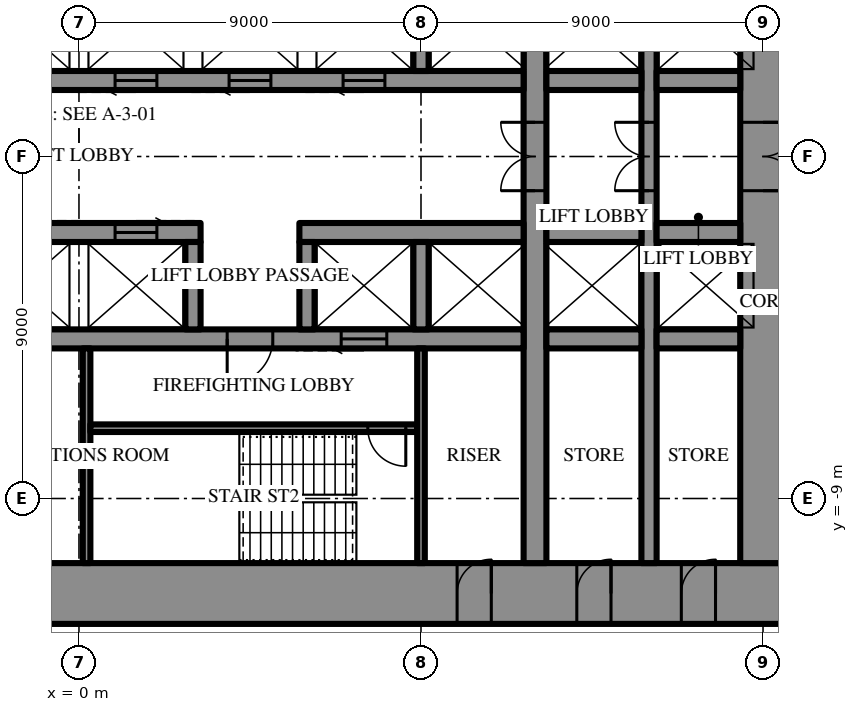
"""IFC4 building model, lengths in metres.
Left out: names, types, materials, properties, quantities, classifications, styles, units other than length and angle.
Written with IfcOpenShell. Run it as: python <this file> out.ifc"""

import sys

from ifc_helpers import new_model, si_unit, direction, frame, frame_2d, origin, place, context, subcontext, project, spatial, rectangle, extrude, element, fill, save


model = new_model("IFC4")
c1 = context("Model", 3, precision=1e-05, world=origin(), true_north=direction((0.0, 1.0)))
c2 = subcontext(c1, "Body", "Model", "MODEL_VIEW")
j1 = project(units=[si_unit("LENGTHUNIT", "METRE"), si_unit("PLANEANGLEUNIT", "RADIAN")], contexts=[c1])
p1 = place(None, origin())
s1 = spatial("IfcSite", under=j1, at=p1, CompositionType="ELEMENT")
p2 = place(p1, origin())
s2 = spatial("IfcBuilding", under=s1, at=p2, CompositionType="ELEMENT")
p3 = place(p2, frame((0.0, 0.0, 48.7)))
s3 = spatial("IfcBuildingStorey", under=s2, at=p3, CompositionType="ELEMENT", Elevation=48.7)
p4 = place(p3, frame((18.6, -11.5, 0.0), z_axis=(0.0, 0.0, 1.0), x_axis=(-1.0, 0.0, 0.0)))
e1 = element("IfcWall", 1, at=p4, inside=s3, PredefinedType="SHEAR", context=c2, shape_type="SweptSolid", body=[
    extrude(rectangle(XDim=37.2, YDim=1.6, at=frame_2d((18.6, 0.0))), origin(), (0.0, 0.0, 1.0), 4.2),
])
p5 = place(p4, frame((19.45, 0.0, 0.0)))
e2 = element("IfcOpeningElement", 2, at=p5, cuts=e1, PredefinedType="OPENING", context=c2, shape_type="SweptSolid", body=[
    extrude(rectangle(XDim=0.9, YDim=2.2, at=frame_2d((0.45, 1.1))), frame((0.0, 0.81, 0.0), z_axis=(0.0, -1.0, 0.0), x_axis=(1.0, 0.0, 0.0)), (0.0, 0.0, 1.0), 1.62),
])
p6 = place(p4, frame((22.45, 0.0, 0.0)))
e3 = element("IfcOpeningElement", 3, at=p6, cuts=e1, PredefinedType="OPENING", context=c2, shape_type="SweptSolid", body=[
    extrude(rectangle(XDim=0.9, YDim=2.2, at=frame_2d((0.45, 1.1))), frame((0.0, 0.81, 0.0), z_axis=(0.0, -1.0, 0.0), x_axis=(1.0, 0.0, 0.0)), (0.0, 0.0, 1.0), 1.62),
])
p7 = place(p4, frame((25.5, 0.0, 0.0)))
e4 = element("IfcOpeningElement", 4, at=p7, cuts=e1, PredefinedType="OPENING", context=c2, shape_type="SweptSolid", body=[
    extrude(rectangle(XDim=1.0, YDim=2.2, at=frame_2d((0.5, 1.1))), frame((0.0, 0.81, 0.0), z_axis=(0.0, -1.0, 0.0), x_axis=(1.0, 0.0, 0.0)), (0.0, 0.0, 1.0), 1.62),
])
p8 = place(p4, frame((1.85, 0.0, 0.0)))
e5 = element("IfcOpeningElement", 5, at=p8, cuts=e1, PredefinedType="OPENING", context=c2, shape_type="SweptSolid", body=[
    extrude(rectangle(XDim=0.9, YDim=2.2, at=frame_2d((0.45, 1.1))), frame((0.0, 0.81, 0.0), z_axis=(0.0, -1.0, 0.0), x_axis=(1.0, 0.0, 0.0)), (0.0, 0.0, 1.0), 1.62),
])
p9 = place(p4, frame((4.6, 0.0, 0.0)))
e6 = element("IfcOpeningElement", 6, at=p9, cuts=e1, PredefinedType="OPENING", context=c2, shape_type="SweptSolid", body=[
    extrude(rectangle(XDim=0.9, YDim=2.2, at=frame_2d((0.45, 1.1))), frame((0.0, 0.81, 0.0), z_axis=(0.0, -1.0, 0.0), x_axis=(1.0, 0.0, 0.0)), (0.0, 0.0, 1.0), 1.62),
])
p10 = place(p4, frame((7.75, 0.0, 0.0)))
e7 = element("IfcOpeningElement", 7, at=p10, cuts=e1, PredefinedType="OPENING", context=c2, shape_type="SweptSolid", body=[
    extrude(rectangle(XDim=0.9, YDim=2.2, at=frame_2d((0.45, 1.1))), frame((0.0, 0.81, 0.0), z_axis=(0.0, -1.0, 0.0), x_axis=(1.0, 0.0, 0.0)), (0.0, 0.0, 1.0), 1.62),
])
p11 = place(p4, frame((28.55, 0.0, 0.0)))
e8 = element("IfcOpeningElement", 8, at=p11, cuts=e1, PredefinedType="OPENING", context=c2, shape_type="SweptSolid", body=[
    extrude(rectangle(XDim=0.9, YDim=2.2, at=frame_2d((0.45, 1.1))), frame((0.0, 0.81, 0.0), z_axis=(0.0, -1.0, 0.0), x_axis=(1.0, 0.0, 0.0)), (0.0, 0.0, 1.0), 1.62),
])
p12 = place(p4, frame((31.7, 0.0, 0.0)))
e9 = element("IfcOpeningElement", 9, at=p12, cuts=e1, PredefinedType="OPENING", context=c2, shape_type="SweptSolid", body=[
    extrude(rectangle(XDim=0.9, YDim=2.2, at=frame_2d((0.45, 1.1))), frame((0.0, 0.81, 0.0), z_axis=(0.0, -1.0, 0.0), x_axis=(1.0, 0.0, 0.0)), (0.0, 0.0, 1.0), 1.62),
])
p13 = place(p4, frame((34.45, 0.0, 0.0)))
e10 = element("IfcOpeningElement", 10, at=p13, cuts=e1, PredefinedType="OPENING", context=c2, shape_type="SweptSolid", body=[
    extrude(rectangle(XDim=0.9, YDim=2.2, at=frame_2d((0.45, 1.1))), frame((0.0, 0.81, 0.0), z_axis=(0.0, -1.0, 0.0), x_axis=(1.0, 0.0, 0.0)), (0.0, 0.0, 1.0), 1.62),
])
p14 = place(p3, frame((18.0, -10.7, 0.0), z_axis=(0.0, 0.0, 1.0), x_axis=(0.0, 1.0, 0.0)))
e11 = element("IfcWall", 11, at=p14, inside=s3, PredefinedType="SHEAR", context=c2, shape_type="SweptSolid", body=[
    extrude(rectangle(XDim=21.4, YDim=1.2, at=frame_2d((10.7, 0.0))), origin(), (0.0, 0.0, 1.0), 4.2),
])
p15 = place(p14, frame((9.8, 0.0, 0.0)))
e12 = element("IfcOpeningElement", 12, at=p15, cuts=e11, PredefinedType="OPENING", context=c2, shape_type="SweptSolid", body=[
    extrude(rectangle(XDim=1.8, YDim=2.4, at=frame_2d((0.9, 1.2))), frame((0.0, 0.61, 0.0), z_axis=(0.0, -1.0, 0.0), x_axis=(1.0, 0.0, 0.0)), (0.0, 0.0, 1.0), 1.22),
])
p16 = place(p3, frame((12.0, -10.7, 0.0), z_axis=(0.0, 0.0, 1.0), x_axis=(0.0, 1.0, 0.0)))
e13 = element("IfcWall", 13, at=p16, inside=s3, PredefinedType="SHEAR", context=c2, shape_type="SweptSolid", body=[
    extrude(rectangle(XDim=21.4, YDim=0.6, at=frame_2d((10.7, 0.0))), origin(), (0.0, 0.0, 1.0), 4.2),
])
p17 = place(p16, frame((9.8, 0.0, 0.0)))
e14 = element("IfcOpeningElement", 14, at=p17, cuts=e13, PredefinedType="OPENING", context=c2, shape_type="SweptSolid", body=[
    extrude(rectangle(XDim=1.8, YDim=2.4, at=frame_2d((0.9, 1.2))), frame((0.0, 0.31, 0.0), z_axis=(0.0, -1.0, 0.0), x_axis=(1.0, 0.0, 0.0)), (0.0, 0.0, 1.0), 0.62),
])
p18 = place(p3, frame((15.0, -10.7, 0.0), z_axis=(0.0, 0.0, 1.0), x_axis=(0.0, 1.0, 0.0)))
e15 = element("IfcWall", 15, at=p18, inside=s3, PredefinedType="SHEAR", context=c2, shape_type="SweptSolid", body=[
    extrude(rectangle(XDim=21.4, YDim=0.4, at=frame_2d((10.7, 0.0))), origin(), (0.0, 0.0, 1.0), 4.2),
])
p19 = place(p18, frame((9.8, 0.0, 0.0)))
e16 = element("IfcOpeningElement", 16, at=p19, cuts=e15, PredefinedType="OPENING", context=c2, shape_type="SweptSolid", body=[
    extrude(rectangle(XDim=1.8, YDim=2.4, at=frame_2d((0.9, 1.2))), frame((0.0, 0.21, 0.0), z_axis=(0.0, -1.0, 0.0), x_axis=(1.0, 0.0, 0.0)), (0.0, 0.0, 1.0), 0.42),
])
p20 = place(p3, frame((-3.2, 2.0, 0.0), z_axis=(0.0, 0.0, 1.0), x_axis=(1.0, 0.0, 0.0)))
e17 = element("IfcWall", 17, at=p20, inside=s3, PredefinedType="SHEAR", context=c2, shape_type="SweptSolid", body=[
    extrude(rectangle(XDim=14.9, YDim=0.5, at=frame_2d((7.45, 0.0))), origin(), (0.0, 0.0, 1.0), 4.2),
])
p21 = place(p20, frame((1.15, 0.0, 0.0)))
e18 = element("IfcOpeningElement", 18, at=p21, cuts=e17, PredefinedType="OPENING", context=c2, shape_type="SweptSolid", body=[
    extrude(rectangle(XDim=1.1, YDim=2.2, at=frame_2d((0.55, 1.1))), frame((0.0, 0.26, 0.0), z_axis=(0.0, -1.0, 0.0), x_axis=(1.0, 0.0, 0.0)), (0.0, 0.0, 1.0), 0.52),
])
p22 = place(p20, frame((4.15, 0.0, 0.0)))
e19 = element("IfcOpeningElement", 19, at=p22, cuts=e17, PredefinedType="OPENING", context=c2, shape_type="SweptSolid", body=[
    extrude(rectangle(XDim=1.1, YDim=2.2, at=frame_2d((0.55, 1.1))), frame((0.0, 0.26, 0.0), z_axis=(0.0, -1.0, 0.0), x_axis=(1.0, 0.0, 0.0)), (0.0, 0.0, 1.0), 0.52),
])
p23 = place(p20, frame((7.15, 0.0, 0.0)))
e20 = element("IfcOpeningElement", 20, at=p23, cuts=e17, PredefinedType="OPENING", context=c2, shape_type="SweptSolid", body=[
    extrude(rectangle(XDim=1.1, YDim=2.2, at=frame_2d((0.55, 1.1))), frame((0.0, 0.26, 0.0), z_axis=(0.0, -1.0, 0.0), x_axis=(1.0, 0.0, 0.0)), (0.0, 0.0, 1.0), 0.52),
])
p24 = place(p20, frame((10.15, 0.0, 0.0)))
e21 = element("IfcOpeningElement", 21, at=p24, cuts=e17, PredefinedType="OPENING", context=c2, shape_type="SweptSolid", body=[
    extrude(rectangle(XDim=1.1, YDim=2.2, at=frame_2d((0.55, 1.1))), frame((0.0, 0.26, 0.0), z_axis=(0.0, -1.0, 0.0), x_axis=(1.0, 0.0, 0.0)), (0.0, 0.0, 1.0), 0.52),
])
p25 = place(p3, frame((12.3, 2.0, 0.0), z_axis=(0.0, 0.0, 1.0), x_axis=(1.0, 0.0, 0.0)))
e22 = element("IfcWall", 22, at=p25, inside=s3, PredefinedType="SHEAR", context=c2, shape_type="SweptSolid", body=[
    extrude(rectangle(XDim=2.5, YDim=0.5, at=frame_2d((1.25, 0.0))), origin(), (0.0, 0.0, 1.0), 4.2),
])
p26 = place(p3, frame((15.2, 2.0, 0.0), z_axis=(0.0, 0.0, 1.0), x_axis=(1.0, 0.0, 0.0)))
e23 = element("IfcWall", 23, at=p26, inside=s3, PredefinedType="SHEAR", context=c2, shape_type="SweptSolid", body=[
    extrude(rectangle(XDim=2.2, YDim=0.5, at=frame_2d((1.1, 0.0))), origin(), (0.0, 0.0, 1.0), 4.2),
])
p27 = place(p3, frame((9.0, 2.25, 0.0), z_axis=(0.0, 0.0, 1.0), x_axis=(0.0, 1.0, 0.0)))
e24 = element("IfcWall", 24, at=p27, inside=s3, PredefinedType="SHEAR", context=c2, shape_type="SweptSolid", body=[
    extrude(rectangle(XDim=2.3, YDim=0.4, at=frame_2d((1.15, 0.0))), origin(), (0.0, 0.0, 1.0), 4.2),
])
p28 = place(p3, frame((17.4, -2.0, 0.0), z_axis=(0.0, 0.0, 1.0), x_axis=(-1.0, 0.0, 0.0)))
e25 = element("IfcWall", 25, at=p28, inside=s3, PredefinedType="SHEAR", context=c2, shape_type="SweptSolid", body=[
    extrude(rectangle(XDim=2.2, YDim=0.5, at=frame_2d((1.1, 0.0))), origin(), (0.0, 0.0, 1.0), 4.2),
])
p29 = place(p3, frame((14.8, -2.0, 0.0), z_axis=(0.0, 0.0, 1.0), x_axis=(-1.0, 0.0, 0.0)))
e26 = element("IfcWall", 26, at=p29, inside=s3, PredefinedType="SHEAR", context=c2, shape_type="SweptSolid", body=[
    extrude(rectangle(XDim=2.5, YDim=0.5, at=frame_2d((1.25, 0.0))), origin(), (0.0, 0.0, 1.0), 4.2),
])
p30 = place(p3, frame((11.7, -2.0, 0.0), z_axis=(0.0, 0.0, 1.0), x_axis=(-1.0, 0.0, 0.0)))
e27 = element("IfcWall", 27, at=p30, inside=s3, PredefinedType="SHEAR", context=c2, shape_type="SweptSolid", body=[
    extrude(rectangle(XDim=5.9, YDim=0.5, at=frame_2d((2.95, 0.0))), origin(), (0.0, 0.0, 1.0), 4.2),
])
p31 = place(p3, frame((3.2, -2.0, 0.0), z_axis=(0.0, 0.0, 1.0), x_axis=(-1.0, 0.0, 0.0)))
e28 = element("IfcWall", 28, at=p31, inside=s3, PredefinedType="SHEAR", context=c2, shape_type="SweptSolid", body=[
    extrude(rectangle(XDim=14.9, YDim=0.5, at=frame_2d((7.45, 0.0))), origin(), (0.0, 0.0, 1.0), 4.2),
])
p32 = place(p31, frame((1.15, 0.0, 0.0)))
e29 = element("IfcOpeningElement", 29, at=p32, cuts=e28, PredefinedType="OPENING", context=c2, shape_type="SweptSolid", body=[
    extrude(rectangle(XDim=1.1, YDim=2.2, at=frame_2d((0.55, 1.1))), frame((0.0, 0.26, 0.0), z_axis=(0.0, -1.0, 0.0), x_axis=(1.0, 0.0, 0.0)), (0.0, 0.0, 1.0), 0.52),
])
p33 = place(p31, frame((4.15, 0.0, 0.0)))
e30 = element("IfcOpeningElement", 30, at=p33, cuts=e28, PredefinedType="OPENING", context=c2, shape_type="SweptSolid", body=[
    extrude(rectangle(XDim=1.1, YDim=2.2, at=frame_2d((0.55, 1.1))), frame((0.0, 0.26, 0.0), z_axis=(0.0, -1.0, 0.0), x_axis=(1.0, 0.0, 0.0)), (0.0, 0.0, 1.0), 0.52),
])
p34 = place(p31, frame((7.15, 0.0, 0.0)))
e31 = element("IfcOpeningElement", 31, at=p34, cuts=e28, PredefinedType="OPENING", context=c2, shape_type="SweptSolid", body=[
    extrude(rectangle(XDim=1.1, YDim=2.2, at=frame_2d((0.55, 1.1))), frame((0.0, 0.26, 0.0), z_axis=(0.0, -1.0, 0.0), x_axis=(1.0, 0.0, 0.0)), (0.0, 0.0, 1.0), 0.52),
])
p35 = place(p31, frame((10.15, 0.0, 0.0)))
e32 = element("IfcOpeningElement", 32, at=p35, cuts=e28, PredefinedType="OPENING", context=c2, shape_type="SweptSolid", body=[
    extrude(rectangle(XDim=1.1, YDim=2.2, at=frame_2d((0.55, 1.1))), frame((0.0, 0.26, 0.0), z_axis=(0.0, -1.0, 0.0), x_axis=(1.0, 0.0, 0.0)), (0.0, 0.0, 1.0), 0.52),
])
p36 = place(p3, frame((17.4, -4.8, 0.0), z_axis=(0.0, 0.0, 1.0), x_axis=(-1.0, 0.0, 0.0)))
e33 = element("IfcWall", 33, at=p36, inside=s3, PredefinedType="SHEAR", context=c2, shape_type="SweptSolid", body=[
    extrude(rectangle(XDim=2.2, YDim=0.5, at=frame_2d((1.1, 0.0))), origin(), (0.0, 0.0, 1.0), 4.2),
])
p37 = place(p3, frame((14.8, -4.8, 0.0), z_axis=(0.0, 0.0, 1.0), x_axis=(-1.0, 0.0, 0.0)))
e34 = element("IfcWall", 34, at=p37, inside=s3, PredefinedType="SHEAR", context=c2, shape_type="SweptSolid", body=[
    extrude(rectangle(XDim=2.5, YDim=0.5, at=frame_2d((1.25, 0.0))), origin(), (0.0, 0.0, 1.0), 4.2),
])
p38 = place(p3, frame((11.7, -4.8, 0.0), z_axis=(0.0, 0.0, 1.0), x_axis=(-1.0, 0.0, 0.0)))
e35 = element("IfcWall", 35, at=p38, inside=s3, PredefinedType="SHEAR", context=c2, shape_type="SweptSolid", body=[
    extrude(rectangle(XDim=23.4, YDim=0.5, at=frame_2d((11.7, 0.0))), origin(), (0.0, 0.0, 1.0), 4.2),
])
p39 = place(p38, frame((6.6, 0.0, 0.0)))
e36 = element("IfcOpeningElement", 36, at=p39, cuts=e35, PredefinedType="OPENING", context=c2, shape_type="SweptSolid", body=[
    extrude(rectangle(XDim=1.2, YDim=2.2, at=frame_2d((0.6, 1.1))), frame((0.0, 0.26, 0.0), z_axis=(0.0, -1.0, 0.0), x_axis=(1.0, 0.0, 0.0)), (0.0, 0.0, 1.0), 0.52),
])
p40 = place(p38, frame((3.6, 0.0, 0.0)))
e37 = element("IfcOpeningElement", 37, at=p40, cuts=e35, PredefinedType="OPENING", context=c2, shape_type="SweptSolid", body=[
    extrude(rectangle(XDim=1.2, YDim=2.2, at=frame_2d((0.6, 1.1))), frame((0.0, 0.26, 0.0), z_axis=(0.0, -1.0, 0.0), x_axis=(1.0, 0.0, 0.0)), (0.0, 0.0, 1.0), 0.52),
])
for number, where, z_axis, x_axis in (
    (38, (9.0, -2.25, 0.0), (0.0, 0.0, 1.0), (0.0, -1.0, 0.0)),
    (39, (6.0, -2.25, 0.0), (0.0, 0.0, 1.0), (0.0, -1.0, 0.0)),
    (40, (3.0, -2.25, 0.0), (0.0, 0.0, 1.0), (0.0, -1.0, 0.0)),
):
    element("IfcWall", number, at=place(p3, frame(where, z_axis=z_axis, x_axis=x_axis)), inside=s3, PredefinedType="SHEAR", context=c2, shape_type="SweptSolid", body=[
        extrude(rectangle(XDim=2.3, YDim=0.4, at=frame_2d((1.15, 0.0))), origin(), (0.0, 0.0, 1.0), 4.2),
    ])
p41 = place(p3, frame((0.2, -5.05, 0.0), z_axis=(0.0, 0.0, 1.0), x_axis=(0.0, -1.0, 0.0)))
e41 = element("IfcWall", 41, at=p41, inside=s3, PredefinedType="SHEAR", context=c2, shape_type="SweptSolid", body=[
    extrude(rectangle(XDim=5.65, YDim=0.2, at=frame_2d((2.825, 0.0))), origin(), (0.0, 0.0, 1.0), 4.2),
])
p42 = place(p3, frame((8.9, -7.15, 0.0), z_axis=(0.0, 0.0, 1.0), x_axis=(-1.0, 0.0, 0.0)))
e42 = element("IfcWall", 42, at=p42, inside=s3, PredefinedType="SHEAR", context=c2, shape_type="SweptSolid", body=[
    extrude(rectangle(XDim=8.6, YDim=0.2, at=frame_2d((4.3, 0.0))), origin(), (0.0, 0.0, 1.0), 4.2),
])
p43 = place(p42, frame((0.3, 0.0, 0.0)))
e43 = element("IfcOpeningElement", 43, at=p43, cuts=e42, PredefinedType="OPENING", context=c2, shape_type="SweptSolid", body=[
    extrude(rectangle(XDim=1.0, YDim=2.2, at=frame_2d((0.5, 1.1))), frame((0.0, 0.11, 0.0), z_axis=(0.0, -1.0, 0.0), x_axis=(1.0, 0.0, 0.0)), (0.0, 0.0, 1.0), 0.22),
])
p44 = place(p3, frame((9.0, -5.05, 0.0), z_axis=(0.0, 0.0, 1.0), x_axis=(0.0, -1.0, 0.0)))
e44 = element("IfcWall", 44, at=p44, inside=s3, PredefinedType="PARTITIONING", context=c2, shape_type="SweptSolid", body=[
    extrude(rectangle(XDim=5.65, YDim=0.2, at=frame_2d((2.825, 0.0))), origin(), (0.0, 0.0, 1.0), 4.0),
])
p45 = place(p15, frame((1.8, 0.0, 0.0), z_axis=(0.0, 0.0, 1.0), x_axis=(-1.0, 0.0, 0.0)))
e45 = element("IfcDoor", 45, at=p45, inside=s3, OperationType="DOUBLE_DOOR_SINGLE_SWING", PredefinedType="DOOR", context=c2, shape_type="SweptSolid", body=[
    extrude(rectangle(XDim=1.8, YDim=2.4, at=frame_2d((0.9, 1.2))), frame((0.0, 0.025, 0.0), z_axis=(0.0, -1.0, 0.0), x_axis=(1.0, 0.0, 0.0)), (0.0, 0.0, 1.0), 0.05),
])
fill(e12, e45)
p46 = place(p39, origin())
e46 = element("IfcDoor", 46, at=p46, inside=s3, OperationType="SINGLE_SWING_LEFT", PredefinedType="DOOR", context=c2, shape_type="SweptSolid", body=[
    extrude(rectangle(XDim=1.2, YDim=2.2, at=frame_2d((0.6, 1.1))), frame((0.0, 0.025, 0.0), z_axis=(0.0, -1.0, 0.0), x_axis=(1.0, 0.0, 0.0)), (0.0, 0.0, 1.0), 0.05),
])
fill(e36, e46)
p47 = place(p43, origin())
e47 = element("IfcDoor", 47, at=p47, inside=s3, OperationType="SINGLE_SWING_RIGHT", PredefinedType="DOOR", context=c2, shape_type="SweptSolid", body=[
    extrude(rectangle(XDim=1.0, YDim=2.2, at=frame_2d((0.5, 1.1))), frame((0.0, 0.025, 0.0), z_axis=(0.0, -1.0, 0.0), x_axis=(1.0, 0.0, 0.0)), (0.0, 0.0, 1.0), 0.05),
])
fill(e43, e47)
p48 = place(p8, frame((0.9, 0.0, 0.0), z_axis=(0.0, 0.0, 1.0), x_axis=(-1.0, 0.0, 0.0)))
e48 = element("IfcDoor", 48, at=p48, inside=s3, OperationType="SINGLE_SWING_LEFT", PredefinedType="DOOR", context=c2, shape_type="SweptSolid", body=[
    extrude(rectangle(XDim=0.9, YDim=2.2, at=frame_2d((0.45, 1.1))), frame((0.0, 0.025, 0.0), z_axis=(0.0, -1.0, 0.0), x_axis=(1.0, 0.0, 0.0)), (0.0, 0.0, 1.0), 0.05),
])
fill(e5, e48)
p49 = place(p9, frame((0.9, 0.0, 0.0), z_axis=(0.0, 0.0, 1.0), x_axis=(-1.0, 0.0, 0.0)))
e49 = element("IfcDoor", 49, at=p49, inside=s3, OperationType="SINGLE_SWING_LEFT", PredefinedType="DOOR", context=c2, shape_type="SweptSolid", body=[
    extrude(rectangle(XDim=0.9, YDim=2.2, at=frame_2d((0.45, 1.1))), frame((0.0, 0.025, 0.0), z_axis=(0.0, -1.0, 0.0), x_axis=(1.0, 0.0, 0.0)), (0.0, 0.0, 1.0), 0.05),
])
fill(e6, e49)
p50 = place(p10, frame((0.9, 0.0, 0.0), z_axis=(0.0, 0.0, 1.0), x_axis=(-1.0, 0.0, 0.0)))
e50 = element("IfcDoor", 50, at=p50, inside=s3, OperationType="SINGLE_SWING_LEFT", PredefinedType="DOOR", context=c2, shape_type="SweptSolid", body=[
    extrude(rectangle(XDim=0.9, YDim=2.2, at=frame_2d((0.45, 1.1))), frame((0.0, 0.025, 0.0), z_axis=(0.0, -1.0, 0.0), x_axis=(1.0, 0.0, 0.0)), (0.0, 0.0, 1.0), 0.05),
])
fill(e7, e50)
p51 = place(p17, origin())
e51 = element("IfcDoor", 51, at=p51, inside=s3, OperationType="DOUBLE_DOOR_SINGLE_SWING", PredefinedType="DOOR", context=c2, shape_type="SweptSolid", body=[
    extrude(rectangle(XDim=1.8, YDim=2.4, at=frame_2d((0.9, 1.2))), frame((0.0, 0.025, 0.0), z_axis=(0.0, -1.0, 0.0), x_axis=(1.0, 0.0, 0.0)), (0.0, 0.0, 1.0), 0.05),
])
fill(e14, e51)
p52 = place(p19, origin())
e52 = element("IfcDoor", 52, at=p52, inside=s3, OperationType="DOUBLE_DOOR_SINGLE_SWING", PredefinedType="DOOR", context=c2, shape_type="SweptSolid", body=[
    extrude(rectangle(XDim=1.8, YDim=2.4, at=frame_2d((0.9, 1.2))), frame((0.0, 0.025, 0.0), z_axis=(0.0, -1.0, 0.0), x_axis=(1.0, 0.0, 0.0)), (0.0, 0.0, 1.0), 0.05),
])
fill(e16, e52)
p53 = place(p22, frame((1.1, 0.0, 0.0), z_axis=(0.0, 0.0, 1.0), x_axis=(-1.0, 0.0, 0.0)))
e53 = element("IfcDoor", 53, at=p53, inside=s3, OperationType="SLIDING_TO_LEFT", PredefinedType="DOOR", context=c2, shape_type="SweptSolid", body=[
    extrude(rectangle(XDim=1.1, YDim=2.2, at=frame_2d((0.55, 1.1))), frame((0.0, 0.025, 0.0), z_axis=(0.0, -1.0, 0.0), x_axis=(1.0, 0.0, 0.0)), (0.0, 0.0, 1.0), 0.05),
])
fill(e19, e53)
p54 = place(p23, frame((1.1, 0.0, 0.0), z_axis=(0.0, 0.0, 1.0), x_axis=(-1.0, 0.0, 0.0)))
e54 = element("IfcDoor", 54, at=p54, inside=s3, OperationType="SLIDING_TO_LEFT", PredefinedType="DOOR", context=c2, shape_type="SweptSolid", body=[
    extrude(rectangle(XDim=1.1, YDim=2.2, at=frame_2d((0.55, 1.1))), frame((0.0, 0.025, 0.0), z_axis=(0.0, -1.0, 0.0), x_axis=(1.0, 0.0, 0.0)), (0.0, 0.0, 1.0), 0.05),
])
fill(e20, e54)
p55 = place(p24, frame((1.1, 0.0, 0.0), z_axis=(0.0, 0.0, 1.0), x_axis=(-1.0, 0.0, 0.0)))
e55 = element("IfcDoor", 55, at=p55, inside=s3, OperationType="SLIDING_TO_LEFT", PredefinedType="DOOR", context=c2, shape_type="SweptSolid", body=[
    extrude(rectangle(XDim=1.1, YDim=2.2, at=frame_2d((0.55, 1.1))), frame((0.0, 0.025, 0.0), z_axis=(0.0, -1.0, 0.0), x_axis=(1.0, 0.0, 0.0)), (0.0, 0.0, 1.0), 0.05),
])
fill(e21, e55)
p56 = place(p40, origin())
e56 = element("IfcDoor", 56, at=p56, inside=s3, OperationType="SLIDING_TO_LEFT", PredefinedType="DOOR", context=c2, shape_type="SweptSolid", body=[
    extrude(rectangle(XDim=1.2, YDim=2.2, at=frame_2d((0.6, 1.1))), frame((0.0, 0.025, 0.0), z_axis=(0.0, -1.0, 0.0), x_axis=(1.0, 0.0, 0.0)), (0.0, 0.0, 1.0), 0.05),
])
fill(e37, e56)
p57 = place(p32, frame((1.1, 0.0, 0.0), z_axis=(0.0, 0.0, 1.0), x_axis=(-1.0, 0.0, 0.0)))
e57 = element("IfcDoor", 57, at=p57, inside=s3, OperationType="SLIDING_TO_LEFT", PredefinedType="DOOR", context=c2, shape_type="SweptSolid", body=[
    extrude(rectangle(XDim=1.1, YDim=2.2, at=frame_2d((0.55, 1.1))), frame((0.0, 0.025, 0.0), z_axis=(0.0, -1.0, 0.0), x_axis=(1.0, 0.0, 0.0)), (0.0, 0.0, 1.0), 0.05),
])
fill(e29, e57)
save(model, sys.argv[1])
